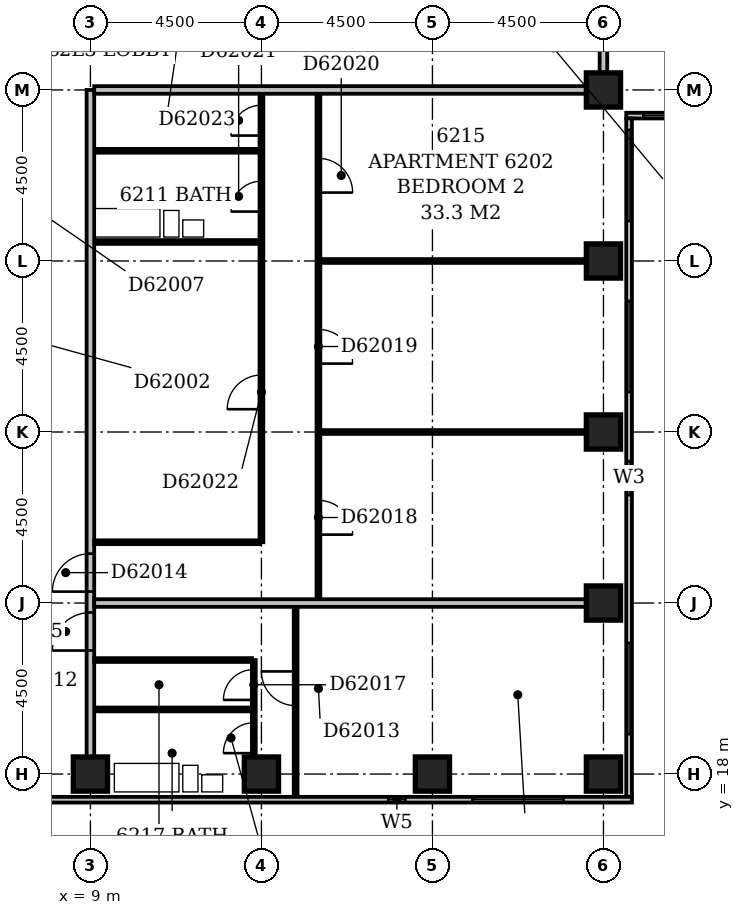
"""IFC4 building model, lengths in metres.
Left out: names, types, materials, properties, quantities, classifications, styles, units other than length and angle.
Written with IfcOpenShell. Run it as: python <this file> out.ifc"""

import sys

from ifc_helpers import new_model, si_unit, direction, frame, frame_2d, origin, origin_2d, place, context, subcontext, project, spatial, rectangle, extrude, element, fill, save


model = new_model("IFC4")
c1 = context("Model", 3, precision=1e-05, world=origin(), true_north=direction((0.0, 1.0)))
c2 = subcontext(c1, "Body", "Model", "MODEL_VIEW")
j1 = project(units=[si_unit("LENGTHUNIT", "METRE"), si_unit("PLANEANGLEUNIT", "RADIAN")], contexts=[c1])
p1 = place(None, origin())
s1 = spatial("IfcSite", under=j1, at=p1, CompositionType="ELEMENT")
p2 = place(p1, origin())
s2 = spatial("IfcBuilding", under=s1, at=p2, CompositionType="ELEMENT")
p3 = place(p2, frame((0.0, 0.0, 240.2)))
s3 = spatial("IfcBuildingStorey", under=s2, at=p3, CompositionType="ELEMENT", Elevation=240.2)
for number, where, z_axis, x_axis in (
    (1, (9.0, 18.0, -0.3), (0.0, 0.0, 1.0), (1.0, 0.0, 0.0)),
    (2, (13.5, 18.0, -0.3), (0.0, 0.0, 1.0), (1.0, 0.0, 0.0)),
    (3, (18.0, 18.0, -0.3), (0.0, 0.0, 1.0), (1.0, 0.0, 0.0)),
    (4, (22.5, 18.0, -0.3), (0.0, 0.0, 1.0), (1.0, 0.0, 0.0)),
    (5, (22.5, 22.5, -0.3), (0.0, 0.0, 1.0), (1.0, 0.0, 0.0)),
    (6, (22.5, 27.0, -0.3), (0.0, 0.0, 1.0), (1.0, 0.0, 0.0)),
    (7, (22.5, 31.5, -0.3), (0.0, 0.0, 1.0), (1.0, 0.0, 0.0)),
    (8, (22.5, 36.0, -0.3), (0.0, 0.0, 1.0), (1.0, 0.0, 0.0)),
):
    element("IfcColumn", number, at=place(p3, frame(where, z_axis=z_axis, x_axis=x_axis)), inside=s3, PredefinedType="COLUMN", context=c2, shape_type="SweptSolid", body=[
        extrude(rectangle(XDim=0.9, YDim=0.9, at=origin_2d()), origin(), (0.0, 0.0, 1.0), 3.6),
    ])
p4 = place(p3, frame((3.9, 17.325, 0.0), z_axis=(0.0, 0.0, 1.0), x_axis=(1.0, 0.0, 0.0)))
e9 = element("IfcWall", 9, at=p4, inside=s3, PredefinedType="STANDARD", context=c2, shape_type="SweptSolid", body=[
    extrude(rectangle(XDim=19.35, YDim=0.15, at=frame_2d((9.675, 0.0))), origin(), (0.0, 0.0, 1.0), 2.7),
])
p5 = place(p4, frame((12.938, 0.0, 0.6)))
e10 = element("IfcOpeningElement", 10, at=p5, cuts=e9, PredefinedType="OPENING", context=c2, shape_type="SweptSolid", body=[
    extrude(rectangle(XDim=0.45, YDim=1.8, at=frame_2d((0.225, 0.9))), frame((0.0, 0.087, 0.0), z_axis=(0.0, -1.0, 0.0), x_axis=(1.0, 0.0, 0.0)), (0.0, 0.0, 1.0), 0.174),
])
p6 = place(p4, frame((15.15, 0.0, 0.6)))
e11 = element("IfcOpeningElement", 11, at=p6, cuts=e9, PredefinedType="OPENING", context=c2, shape_type="SweptSolid", body=[
    extrude(rectangle(XDim=2.4, YDim=1.8, at=frame_2d((1.2, 0.9))), frame((0.0, 0.087, 0.0), z_axis=(0.0, -1.0, 0.0), x_axis=(1.0, 0.0, 0.0)), (0.0, 0.0, 1.0), 0.174),
])
p7 = place(p3, frame((23.175, 17.4, 0.0), z_axis=(0.0, 0.0, 1.0), x_axis=(0.0, 1.0, 0.0)))
e12 = element("IfcWall", 12, at=p7, inside=s3, PredefinedType="STANDARD", context=c2, shape_type="SweptSolid", body=[
    extrude(rectangle(XDim=17.85, YDim=0.15, at=frame_2d((8.925, 0.0))), origin(), (0.0, 0.0, 1.0), 2.7),
])
p8 = place(p7, frame((1.65, 0.0, 0.6)))
e13 = element("IfcOpeningElement", 13, at=p8, cuts=e12, PredefinedType="OPENING", context=c2, shape_type="SweptSolid", body=[
    extrude(rectangle(XDim=2.4, YDim=1.8, at=frame_2d((1.2, 0.9))), frame((0.0, 0.087, 0.0), z_axis=(0.0, -1.0, 0.0), x_axis=(1.0, 0.0, 0.0)), (0.0, 0.0, 1.0), 0.174),
])
p9 = place(p7, frame((7.936, 0.0, 0.6)))
e14 = element("IfcOpeningElement", 14, at=p9, cuts=e12, PredefinedType="OPENING", context=c2, shape_type="SweptSolid", body=[
    extrude(rectangle(XDim=0.9, YDim=1.8, at=frame_2d((0.45, 0.9))), frame((0.0, 0.087, 0.0), z_axis=(0.0, -1.0, 0.0), x_axis=(1.0, 0.0, 0.0)), (0.0, 0.0, 1.0), 0.174),
])
p10 = place(p7, frame((10.65, 0.0, 0.6)))
e15 = element("IfcOpeningElement", 15, at=p10, cuts=e12, PredefinedType="OPENING", context=c2, shape_type="SweptSolid", body=[
    extrude(rectangle(XDim=2.4, YDim=1.8, at=frame_2d((1.2, 0.9))), frame((0.0, 0.087, 0.0), z_axis=(0.0, -1.0, 0.0), x_axis=(1.0, 0.0, 0.0)), (0.0, 0.0, 1.0), 0.174),
])
p11 = place(p7, frame((15.15, 0.0, 0.6)))
e16 = element("IfcOpeningElement", 16, at=p11, cuts=e12, PredefinedType="OPENING", context=c2, shape_type="SweptSolid", body=[
    extrude(rectangle(XDim=2.4, YDim=1.8, at=frame_2d((1.2, 0.9))), frame((0.0, 0.087, 0.0), z_axis=(0.0, -1.0, 0.0), x_axis=(1.0, 0.0, 0.0)), (0.0, 0.0, 1.0), 0.174),
])
p12 = place(p3, frame((23.1, 35.325, 0.0), z_axis=(0.0, 0.0, 1.0), x_axis=(1.0, 0.0, 0.0)))
e17 = element("IfcWall", 17, at=p12, inside=s3, PredefinedType="STANDARD", context=c2, shape_type="SweptSolid", body=[
    extrude(rectangle(XDim=3.9, YDim=0.15, at=frame_2d((1.95, 0.0))), origin(), (0.0, 0.0, 1.0), 2.7),
])
p13 = place(p12, frame((0.45, 0.0, 0.6)))
e18 = element("IfcOpeningElement", 18, at=p13, cuts=e17, PredefinedType="OPENING", context=c2, shape_type="SweptSolid", body=[
    extrude(rectangle(XDim=2.4, YDim=1.8, at=frame_2d((1.2, 0.9))), frame((0.0, 0.087, 0.0), z_axis=(0.0, -1.0, 0.0), x_axis=(1.0, 0.0, 0.0)), (0.0, 0.0, 1.0), 0.174),
])
p14 = place(p3, frame((14.4, 17.4, 0.0), z_axis=(0.0, 0.0, 1.0), x_axis=(0.0, 1.0, 0.0)))
e19 = element("IfcWall", 19, at=p14, inside=s3, PredefinedType="PARTITIONING", context=c2, shape_type="SweptSolid", body=[
    extrude(rectangle(XDim=5.0, YDim=0.1, at=frame_2d((2.5, 0.0))), origin(), (0.0, 0.0, 1.0), 3.3),
])
p15 = place(p14, frame((2.4, 0.0, 0.0)))
e20 = element("IfcOpeningElement", 20, at=p15, cuts=e19, PredefinedType="OPENING", context=c2, shape_type="SweptSolid", body=[
    extrude(rectangle(XDim=0.9, YDim=2.1, at=frame_2d((0.45, 1.05))), frame((0.0, 0.062, 0.0), z_axis=(0.0, -1.0, 0.0), x_axis=(1.0, 0.0, 0.0)), (0.0, 0.0, 1.0), 0.124),
])
p16 = place(p3, frame((9.0, 18.45, 0.0), z_axis=(0.0, 0.0, 1.0), x_axis=(0.0, 1.0, 0.0)))
e21 = element("IfcWall", 21, at=p16, inside=s3, PredefinedType="PARTITIONING", context=c2, shape_type="SweptSolid", body=[
    extrude(rectangle(XDim=17.55, YDim=0.2, at=frame_2d((8.775, 0.0))), origin(), (0.0, 0.0, 1.0), 3.3),
])
p17 = place(p16, frame((4.35, 0.0, 0.0)))
e22 = element("IfcOpeningElement", 22, at=p17, cuts=e21, PredefinedType="OPENING", context=c2, shape_type="SweptSolid", body=[
    extrude(rectangle(XDim=1.0, YDim=2.1, at=frame_2d((0.5, 1.05))), frame((0.0, 0.112, 0.0), z_axis=(0.0, -1.0, 0.0), x_axis=(1.0, 0.0, 0.0)), (0.0, 0.0, 1.0), 0.224),
])
p18 = place(p16, frame((2.8, 0.0, 0.0)))
e23 = element("IfcOpeningElement", 23, at=p18, cuts=e21, PredefinedType="OPENING", context=c2, shape_type="SweptSolid", body=[
    extrude(rectangle(XDim=1.0, YDim=2.1, at=frame_2d((0.5, 1.05))), frame((0.0, 0.112, 0.0), z_axis=(0.0, -1.0, 0.0), x_axis=(1.0, 0.0, 0.0)), (0.0, 0.0, 1.0), 0.224),
])
p19 = place(p3, frame((13.3, 18.45, 0.0), z_axis=(0.0, 0.0, 1.0), x_axis=(0.0, 1.0, 0.0)))
e24 = element("IfcWall", 24, at=p19, inside=s3, PredefinedType="PARTITIONING", context=c2, shape_type="SweptSolid", body=[
    extrude(rectangle(XDim=2.55, YDim=0.1, at=frame_2d((1.275, 0.0))), origin(), (0.0, 0.0, 1.0), 3.3),
])
p20 = place(p19, frame((0.1, 0.0, 0.0)))
e25 = element("IfcOpeningElement", 25, at=p20, cuts=e24, PredefinedType="OPENING", context=c2, shape_type="SweptSolid", body=[
    extrude(rectangle(XDim=0.8, YDim=2.1, at=frame_2d((0.4, 1.05))), frame((0.0, 0.062, 0.0), z_axis=(0.0, -1.0, 0.0), x_axis=(1.0, 0.0, 0.0)), (0.0, 0.0, 1.0), 0.124),
])
p21 = place(p19, frame((1.5, 0.0, 0.0)))
e26 = element("IfcOpeningElement", 26, at=p21, cuts=e24, PredefinedType="OPENING", context=c2, shape_type="SweptSolid", body=[
    extrude(rectangle(XDim=0.8, YDim=2.1, at=frame_2d((0.4, 1.05))), frame((0.0, 0.062, 0.0), z_axis=(0.0, -1.0, 0.0), x_axis=(1.0, 0.0, 0.0)), (0.0, 0.0, 1.0), 0.124),
])
p22 = place(p3, frame((9.1, 19.7, 0.0), z_axis=(0.0, 0.0, 1.0), x_axis=(1.0, 0.0, 0.0)))
e27 = element("IfcWall", 27, at=p22, inside=s3, PredefinedType="PLUMBINGWALL", context=c2, shape_type="SweptSolid", body=[
    extrude(rectangle(XDim=4.15, YDim=0.1, at=frame_2d((2.075, 0.0))), origin(), (0.0, 0.0, 1.0), 3.3),
])
p23 = place(p3, frame((9.1, 21.0, 0.0), z_axis=(0.0, 0.0, 1.0), x_axis=(1.0, 0.0, 0.0)))
e28 = element("IfcWall", 28, at=p23, inside=s3, PredefinedType="PARTITIONING", context=c2, shape_type="SweptSolid", body=[
    extrude(rectangle(XDim=4.15, YDim=0.1, at=frame_2d((2.075, 0.0))), origin(), (0.0, 0.0, 1.0), 3.3),
])
p24 = place(p3, frame((9.1, 22.5, 0.0), z_axis=(0.0, 0.0, 1.0), x_axis=(1.0, 0.0, 0.0)))
e29 = element("IfcWall", 29, at=p24, inside=s3, PredefinedType="PARTITIONING", context=c2, shape_type="SweptSolid", body=[
    extrude(rectangle(XDim=12.95, YDim=0.2, at=frame_2d((6.475, 0.0))), origin(), (0.0, 0.0, 1.0), 3.3),
])
p25 = place(p3, frame((15.0, 22.6, 0.0), z_axis=(0.0, 0.0, 1.0), x_axis=(0.0, 1.0, 0.0)))
e30 = element("IfcWall", 30, at=p25, inside=s3, PredefinedType="PARTITIONING", context=c2, shape_type="SweptSolid", body=[
    extrude(rectangle(XDim=13.3, YDim=0.1, at=frame_2d((6.65, 0.0))), origin(), (0.0, 0.0, 1.0), 3.3),
])
p26 = place(p25, frame((1.7, 0.0, 0.0)))
e31 = element("IfcOpeningElement", 31, at=p26, cuts=e30, PredefinedType="OPENING", context=c2, shape_type="SweptSolid", body=[
    extrude(rectangle(XDim=0.9, YDim=2.1, at=frame_2d((0.45, 1.05))), frame((0.0, 0.062, 0.0), z_axis=(0.0, -1.0, 0.0), x_axis=(1.0, 0.0, 0.0)), (0.0, 0.0, 1.0), 0.124),
])
p27 = place(p25, frame((6.2, 0.0, 0.0)))
e32 = element("IfcOpeningElement", 32, at=p27, cuts=e30, PredefinedType="OPENING", context=c2, shape_type="SweptSolid", body=[
    extrude(rectangle(XDim=0.9, YDim=2.1, at=frame_2d((0.45, 1.05))), frame((0.0, 0.062, 0.0), z_axis=(0.0, -1.0, 0.0), x_axis=(1.0, 0.0, 0.0)), (0.0, 0.0, 1.0), 0.124),
])
p28 = place(p25, frame((10.7, 0.0, 0.0)))
e33 = element("IfcOpeningElement", 33, at=p28, cuts=e30, PredefinedType="OPENING", context=c2, shape_type="SweptSolid", body=[
    extrude(rectangle(XDim=0.9, YDim=2.1, at=frame_2d((0.45, 1.05))), frame((0.0, 0.062, 0.0), z_axis=(0.0, -1.0, 0.0), x_axis=(1.0, 0.0, 0.0)), (0.0, 0.0, 1.0), 0.124),
])
p29 = place(p3, frame((9.1, 24.1, 0.0), z_axis=(0.0, 0.0, 1.0), x_axis=(1.0, 0.0, 0.0)))
e34 = element("IfcWall", 34, at=p29, inside=s3, PredefinedType="PARTITIONING", context=c2, shape_type="SweptSolid", body=[
    extrude(rectangle(XDim=4.35, YDim=0.1, at=frame_2d((2.175, 0.0))), origin(), (0.0, 0.0, 1.0), 3.3),
])
p30 = place(p3, frame((13.5, 24.1, 0.0), z_axis=(0.0, 0.0, 1.0), x_axis=(0.0, 1.0, 0.0)))
e35 = element("IfcWall", 35, at=p30, inside=s3, PredefinedType="PARTITIONING", context=c2, shape_type="SweptSolid", body=[
    extrude(rectangle(XDim=11.8, YDim=0.1, at=frame_2d((5.9, 0.0))), origin(), (0.0, 0.0, 1.0), 3.3),
])
p31 = place(p30, frame((8.7, 0.0, 0.0)))
e36 = element("IfcOpeningElement", 36, at=p31, cuts=e35, PredefinedType="OPENING", context=c2, shape_type="SweptSolid", body=[
    extrude(rectangle(XDim=0.8, YDim=2.1, at=frame_2d((0.4, 1.05))), frame((0.0, 0.062, 0.0), z_axis=(0.0, -1.0, 0.0), x_axis=(1.0, 0.0, 0.0)), (0.0, 0.0, 1.0), 0.124),
])
p32 = place(p30, frame((3.5, 0.0, 0.0)))
e37 = element("IfcOpeningElement", 37, at=p32, cuts=e35, PredefinedType="OPENING", context=c2, shape_type="SweptSolid", body=[
    extrude(rectangle(XDim=0.9, YDim=2.1, at=frame_2d((0.45, 1.05))), frame((0.0, 0.062, 0.0), z_axis=(0.0, -1.0, 0.0), x_axis=(1.0, 0.0, 0.0)), (0.0, 0.0, 1.0), 0.124),
])
p33 = place(p30, frame((10.7, 0.0, 0.0)))
e38 = element("IfcOpeningElement", 38, at=p33, cuts=e35, PredefinedType="OPENING", context=c2, shape_type="SweptSolid", body=[
    extrude(rectangle(XDim=0.8, YDim=2.1, at=frame_2d((0.4, 1.05))), frame((0.0, 0.062, 0.0), z_axis=(0.0, -1.0, 0.0), x_axis=(1.0, 0.0, 0.0)), (0.0, 0.0, 1.0), 0.124),
])
p34 = place(p3, frame((15.05, 27.0, 0.0), z_axis=(0.0, 0.0, 1.0), x_axis=(1.0, 0.0, 0.0)))
e39 = element("IfcWall", 39, at=p34, inside=s3, PredefinedType="PARTITIONING", context=c2, shape_type="SweptSolid", body=[
    extrude(rectangle(XDim=7.0, YDim=0.1, at=frame_2d((3.5, 0.0))), origin(), (0.0, 0.0, 1.0), 2.7),
])
p35 = place(p3, frame((15.05, 31.5, 0.0), z_axis=(0.0, 0.0, 1.0), x_axis=(1.0, 0.0, 0.0)))
e40 = element("IfcWall", 40, at=p35, inside=s3, PredefinedType="PARTITIONING", context=c2, shape_type="SweptSolid", body=[
    extrude(rectangle(XDim=7.0, YDim=0.1, at=frame_2d((3.5, 0.0))), origin(), (0.0, 0.0, 1.0), 3.3),
])
for number, where, z_axis, x_axis in (
    (41, (9.1, 32.0, 0.0), (0.0, 0.0, 1.0), (1.0, 0.0, 0.0)),
    (42, (9.1, 34.4, 0.0), (0.0, 0.0, 1.0), (1.0, 0.0, 0.0)),
):
    element("IfcWall", number, at=place(p3, frame(where, z_axis=z_axis, x_axis=x_axis)), inside=s3, PredefinedType="PLUMBINGWALL", context=c2, shape_type="SweptSolid", body=[
        extrude(rectangle(XDim=4.35, YDim=0.1, at=frame_2d((2.175, 0.0))), origin(), (0.0, 0.0, 1.0), 3.3),
    ])
p36 = place(p3, frame((9.1, 36.0, 0.0), z_axis=(0.0, 0.0, 1.0), x_axis=(1.0, 0.0, 0.0)))
e43 = element("IfcWall", 43, at=p36, inside=s3, PredefinedType="PARTITIONING", context=c2, shape_type="SweptSolid", body=[
    extrude(rectangle(XDim=12.95, YDim=0.2, at=frame_2d((6.475, 0.0))), origin(), (0.0, 0.0, 1.0), 3.3),
])
p37 = place(p3, frame((22.5, 36.45, 0.0), z_axis=(0.0, 0.0, 1.0), x_axis=(0.0, 1.0, 0.0)))
e44 = element("IfcWall", 44, at=p37, inside=s3, PredefinedType="PARTITIONING", context=c2, shape_type="SweptSolid", body=[
    extrude(rectangle(XDim=13.05, YDim=0.2, at=frame_2d((6.525, 0.0))), origin(), (0.0, 0.0, 1.0), 3.3),
])
p38 = place(p5, origin())
e45 = element("IfcWindow", 45, at=p38, inside=s3, PartitioningType="SINGLE_PANEL", PredefinedType="WINDOW", context=c2, shape_type="SweptSolid", body=[
    extrude(rectangle(XDim=0.45, YDim=1.8, at=frame_2d((0.225, 0.9))), frame((0.0, 0.03, 0.0), z_axis=(0.0, -1.0, 0.0), x_axis=(1.0, 0.0, 0.0)), (0.0, 0.0, 1.0), 0.06),
])
fill(e10, e45)
p39 = place(p6, origin())
e46 = element("IfcWindow", 46, at=p39, inside=s3, PartitioningType="SINGLE_PANEL", PredefinedType="WINDOW", context=c2, shape_type="SweptSolid", body=[
    extrude(rectangle(XDim=2.4, YDim=1.8, at=frame_2d((1.2, 0.9))), frame((0.0, 0.03, 0.0), z_axis=(0.0, -1.0, 0.0), x_axis=(1.0, 0.0, 0.0)), (0.0, 0.0, 1.0), 0.06),
])
fill(e11, e46)
p40 = place(p8, origin())
e47 = element("IfcWindow", 47, at=p40, inside=s3, PartitioningType="SINGLE_PANEL", PredefinedType="WINDOW", context=c2, shape_type="SweptSolid", body=[
    extrude(rectangle(XDim=2.4, YDim=1.8, at=frame_2d((1.2, 0.9))), frame((0.0, 0.03, 0.0), z_axis=(0.0, -1.0, 0.0), x_axis=(1.0, 0.0, 0.0)), (0.0, 0.0, 1.0), 0.06),
])
fill(e13, e47)
p41 = place(p9, origin())
e48 = element("IfcWindow", 48, at=p41, inside=s3, PartitioningType="SINGLE_PANEL", PredefinedType="WINDOW", context=c2, shape_type="SweptSolid", body=[
    extrude(rectangle(XDim=0.9, YDim=1.8, at=frame_2d((0.45, 0.9))), frame((0.0, 0.03, 0.0), z_axis=(0.0, -1.0, 0.0), x_axis=(1.0, 0.0, 0.0)), (0.0, 0.0, 1.0), 0.06),
])
fill(e14, e48)
p42 = place(p10, origin())
e49 = element("IfcWindow", 49, at=p42, inside=s3, PartitioningType="SINGLE_PANEL", PredefinedType="WINDOW", context=c2, shape_type="SweptSolid", body=[
    extrude(rectangle(XDim=2.4, YDim=1.8, at=frame_2d((1.2, 0.9))), frame((0.0, 0.03, 0.0), z_axis=(0.0, -1.0, 0.0), x_axis=(1.0, 0.0, 0.0)), (0.0, 0.0, 1.0), 0.06),
])
fill(e15, e49)
p43 = place(p11, origin())
e50 = element("IfcWindow", 50, at=p43, inside=s3, PartitioningType="SINGLE_PANEL", PredefinedType="WINDOW", context=c2, shape_type="SweptSolid", body=[
    extrude(rectangle(XDim=2.4, YDim=1.8, at=frame_2d((1.2, 0.9))), frame((0.0, 0.03, 0.0), z_axis=(0.0, -1.0, 0.0), x_axis=(1.0, 0.0, 0.0)), (0.0, 0.0, 1.0), 0.06),
])
fill(e16, e50)
p44 = place(p13, origin())
e51 = element("IfcWindow", 51, at=p44, inside=s3, PartitioningType="SINGLE_PANEL", PredefinedType="WINDOW", context=c2, shape_type="SweptSolid", body=[
    extrude(rectangle(XDim=2.4, YDim=1.8, at=frame_2d((1.2, 0.9))), frame((0.0, 0.03, 0.0), z_axis=(0.0, -1.0, 0.0), x_axis=(1.0, 0.0, 0.0)), (0.0, 0.0, 1.0), 0.06),
])
fill(e18, e51)
p45 = place(p15, frame((0.9, 0.0, 0.0), z_axis=(0.0, 0.0, 1.0), x_axis=(-1.0, 0.0, 0.0)))
e52 = element("IfcDoor", 52, at=p45, inside=s3, OperationType="SINGLE_SWING_LEFT", PredefinedType="DOOR", context=c2, shape_type="SweptSolid", body=[
    extrude(rectangle(XDim=0.9, YDim=2.1, at=frame_2d((0.45, 1.05))), frame((0.0, 0.025, 0.0), z_axis=(0.0, -1.0, 0.0), x_axis=(1.0, 0.0, 0.0)), (0.0, 0.0, 1.0), 0.05),
])
fill(e20, e52)
p46 = place(p17, origin())
e53 = element("IfcDoor", 53, at=p46, inside=s3, OperationType="SINGLE_SWING_LEFT", PredefinedType="DOOR", context=c2, shape_type="SweptSolid", body=[
    extrude(rectangle(XDim=1.0, YDim=2.1, at=frame_2d((0.5, 1.05))), frame((0.0, 0.025, 0.0), z_axis=(0.0, -1.0, 0.0), x_axis=(1.0, 0.0, 0.0)), (0.0, 0.0, 1.0), 0.05),
])
fill(e22, e53)
p47 = place(p18, origin())
e54 = element("IfcDoor", 54, at=p47, inside=s3, OperationType="SINGLE_SWING_LEFT", PredefinedType="DOOR", context=c2, shape_type="SweptSolid", body=[
    extrude(rectangle(XDim=1.0, YDim=2.1, at=frame_2d((0.5, 1.05))), frame((0.0, 0.025, 0.0), z_axis=(0.0, -1.0, 0.0), x_axis=(1.0, 0.0, 0.0)), (0.0, 0.0, 1.0), 0.05),
])
fill(e23, e54)
p48 = place(p20, origin())
e55 = element("IfcDoor", 55, at=p48, inside=s3, OperationType="SINGLE_SWING_LEFT", PredefinedType="DOOR", context=c2, shape_type="SweptSolid", body=[
    extrude(rectangle(XDim=0.8, YDim=2.1, at=frame_2d((0.4, 1.05))), frame((0.0, 0.025, 0.0), z_axis=(0.0, -1.0, 0.0), x_axis=(1.0, 0.0, 0.0)), (0.0, 0.0, 1.0), 0.05),
])
fill(e25, e55)
p49 = place(p21, origin())
e56 = element("IfcDoor", 56, at=p49, inside=s3, OperationType="SINGLE_SWING_LEFT", PredefinedType="DOOR", context=c2, shape_type="SweptSolid", body=[
    extrude(rectangle(XDim=0.8, YDim=2.1, at=frame_2d((0.4, 1.05))), frame((0.0, 0.025, 0.0), z_axis=(0.0, -1.0, 0.0), x_axis=(1.0, 0.0, 0.0)), (0.0, 0.0, 1.0), 0.05),
])
fill(e26, e56)
p50 = place(p26, frame((0.9, 0.0, 0.0), z_axis=(0.0, 0.0, 1.0), x_axis=(-1.0, 0.0, 0.0)))
e57 = element("IfcDoor", 57, at=p50, inside=s3, OperationType="SINGLE_SWING_RIGHT", PredefinedType="DOOR", context=c2, shape_type="SweptSolid", body=[
    extrude(rectangle(XDim=0.9, YDim=2.1, at=frame_2d((0.45, 1.05))), frame((0.0, 0.025, 0.0), z_axis=(0.0, -1.0, 0.0), x_axis=(1.0, 0.0, 0.0)), (0.0, 0.0, 1.0), 0.05),
])
fill(e31, e57)
p51 = place(p27, frame((0.9, 0.0, 0.0), z_axis=(0.0, 0.0, 1.0), x_axis=(-1.0, 0.0, 0.0)))
e58 = element("IfcDoor", 58, at=p51, inside=s3, OperationType="SINGLE_SWING_RIGHT", PredefinedType="DOOR", context=c2, shape_type="SweptSolid", body=[
    extrude(rectangle(XDim=0.9, YDim=2.1, at=frame_2d((0.45, 1.05))), frame((0.0, 0.025, 0.0), z_axis=(0.0, -1.0, 0.0), x_axis=(1.0, 0.0, 0.0)), (0.0, 0.0, 1.0), 0.05),
])
fill(e32, e58)
p52 = place(p28, frame((0.9, 0.0, 0.0), z_axis=(0.0, 0.0, 1.0), x_axis=(-1.0, 0.0, 0.0)))
e59 = element("IfcDoor", 59, at=p52, inside=s3, OperationType="SINGLE_SWING_RIGHT", PredefinedType="DOOR", context=c2, shape_type="SweptSolid", body=[
    extrude(rectangle(XDim=0.9, YDim=2.1, at=frame_2d((0.45, 1.05))), frame((0.0, 0.025, 0.0), z_axis=(0.0, -1.0, 0.0), x_axis=(1.0, 0.0, 0.0)), (0.0, 0.0, 1.0), 0.05),
])
fill(e33, e59)
p53 = place(p31, origin())
e60 = element("IfcDoor", 60, at=p53, inside=s3, OperationType="SINGLE_SWING_LEFT", PredefinedType="DOOR", context=c2, shape_type="SweptSolid", body=[
    extrude(rectangle(XDim=0.8, YDim=2.1, at=frame_2d((0.4, 1.05))), frame((0.0, 0.025, 0.0), z_axis=(0.0, -1.0, 0.0), x_axis=(1.0, 0.0, 0.0)), (0.0, 0.0, 1.0), 0.05),
])
fill(e36, e60)
p54 = place(p32, origin())
e61 = element("IfcDoor", 61, at=p54, inside=s3, OperationType="SINGLE_SWING_LEFT", PredefinedType="DOOR", context=c2, shape_type="SweptSolid", body=[
    extrude(rectangle(XDim=0.9, YDim=2.1, at=frame_2d((0.45, 1.05))), frame((0.0, 0.025, 0.0), z_axis=(0.0, -1.0, 0.0), x_axis=(1.0, 0.0, 0.0)), (0.0, 0.0, 1.0), 0.05),
])
fill(e37, e61)
p55 = place(p33, origin())
e62 = element("IfcDoor", 62, at=p55, inside=s3, OperationType="SINGLE_SWING_LEFT", PredefinedType="DOOR", context=c2, shape_type="SweptSolid", body=[
    extrude(rectangle(XDim=0.8, YDim=2.1, at=frame_2d((0.4, 1.05))), frame((0.0, 0.025, 0.0), z_axis=(0.0, -1.0, 0.0), x_axis=(1.0, 0.0, 0.0)), (0.0, 0.0, 1.0), 0.05),
])
fill(e38, e62)
save(model, sys.argv[1])
